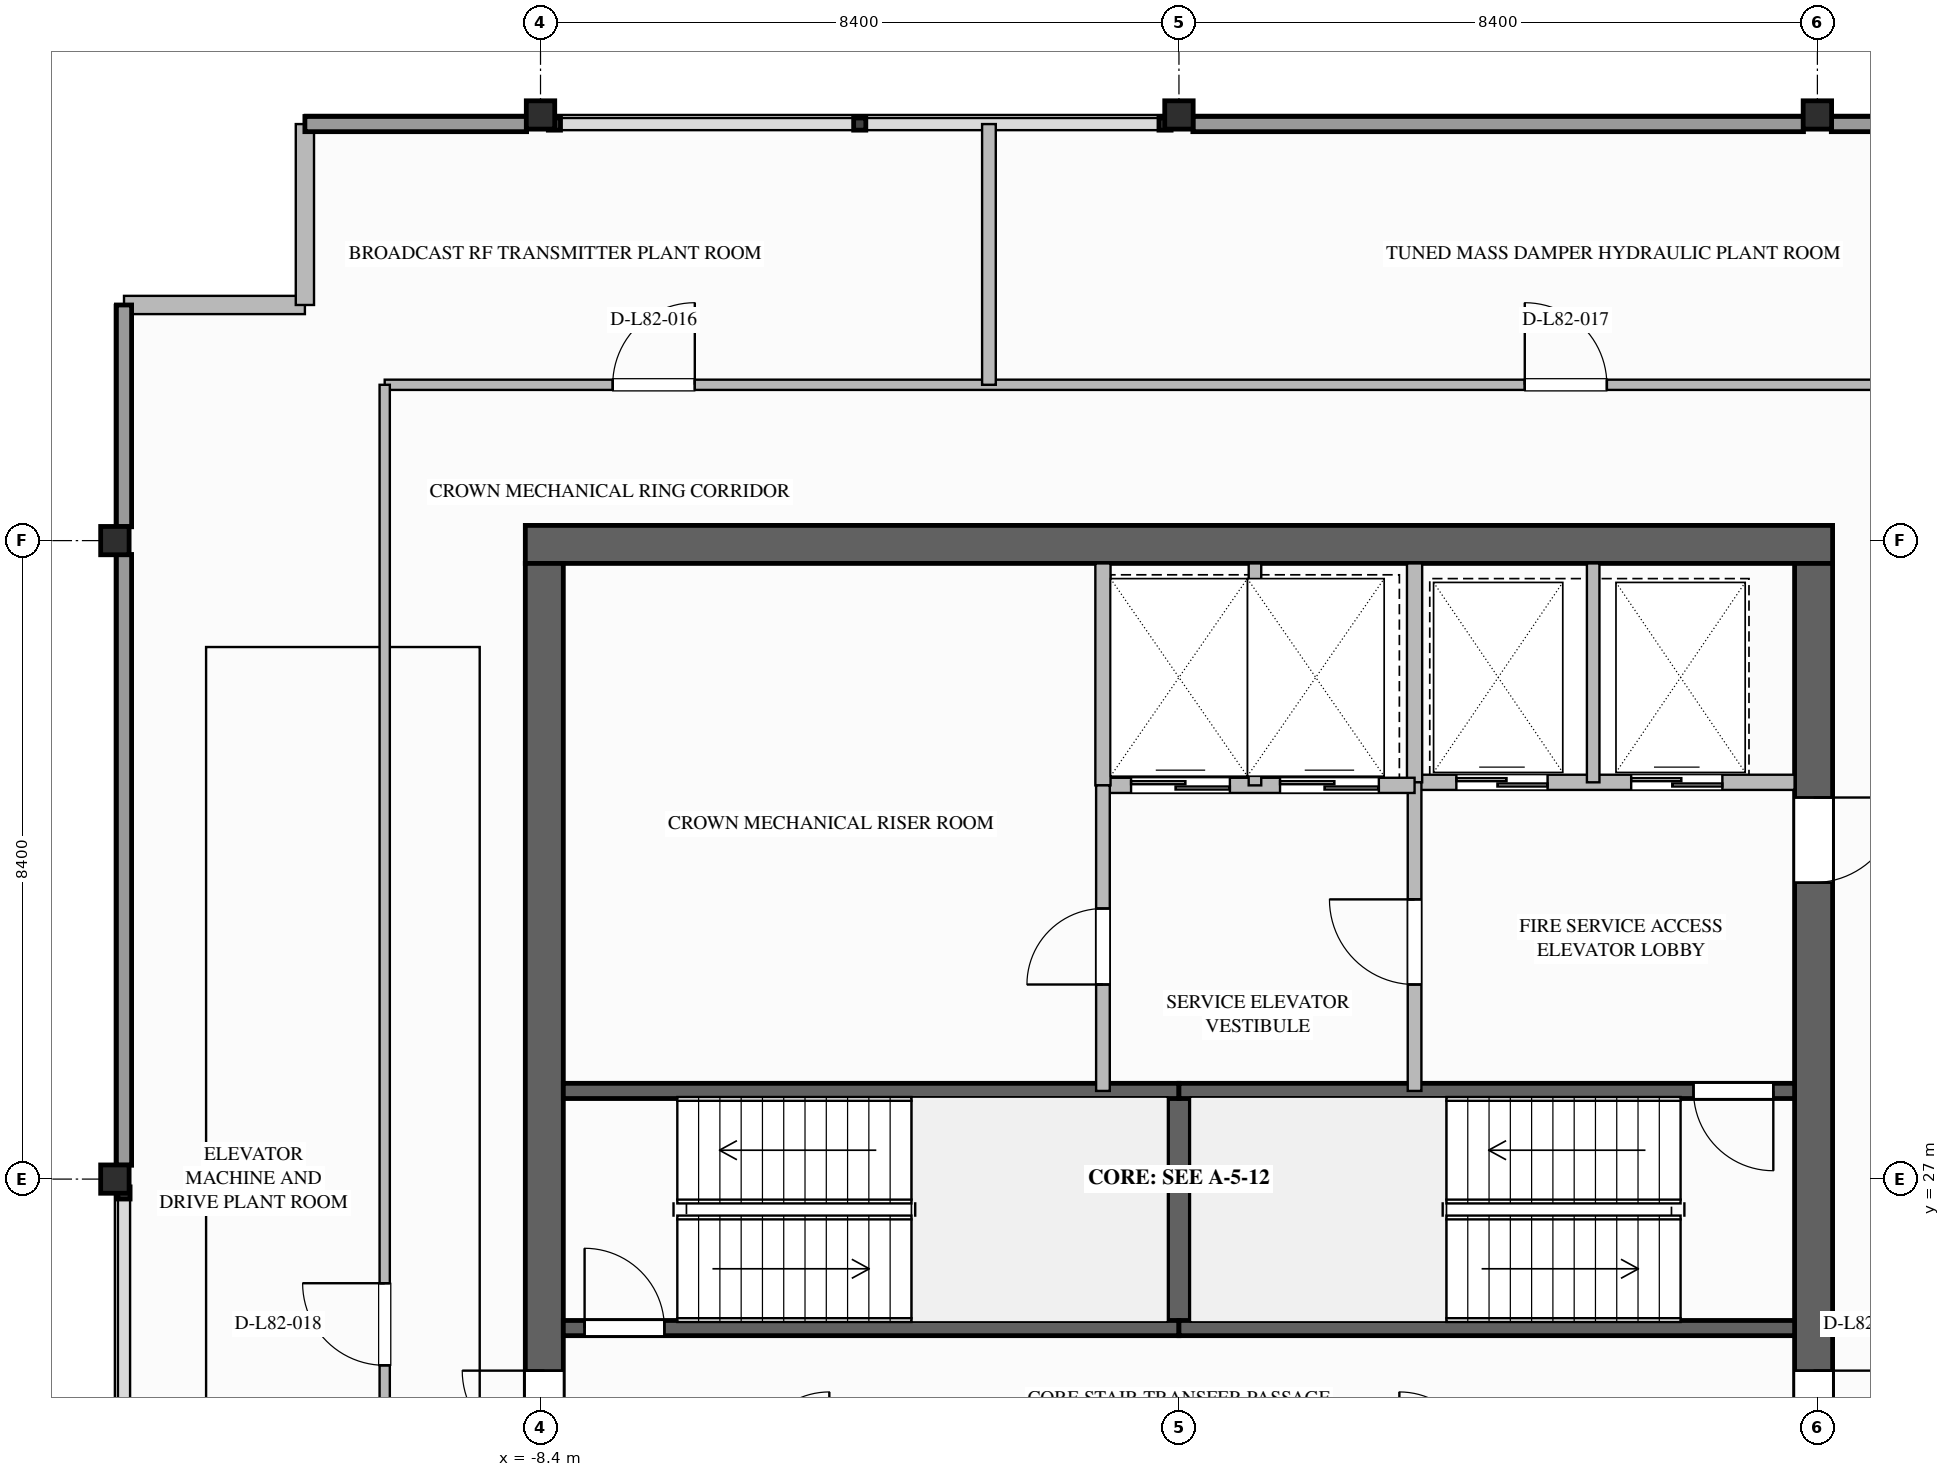
"""IFC4 building model, lengths in metres.
Left out: names, types, materials, properties, quantities, classifications, styles, units other than length and angle.
Written with IfcOpenShell. Run it as: python <this file> out.ifc"""

import sys

from ifc_helpers import new_model, si_unit, direction, frame, frame_2d, origin, origin_2d, place, context, subcontext, project, spatial, rectangle, i_section, extrude, element, fill, save


model = new_model("IFC4")
c1 = context("Model", 3, precision=1e-05, world=origin(), true_north=direction((0.0, 1.0)))
c2 = subcontext(c1, "Body", "Model", "MODEL_VIEW")
j1 = project(units=[si_unit("LENGTHUNIT", "METRE"), si_unit("PLANEANGLEUNIT", "RADIAN")], contexts=[c1])
p1 = place(None, origin())
s1 = spatial("IfcSite", under=j1, at=p1, CompositionType="ELEMENT")
p2 = place(p1, origin())
s2 = spatial("IfcBuilding", under=s1, at=p2, CompositionType="ELEMENT")
p3 = place(p2, frame((0.0, 0.0, 315.4)))
s3 = spatial("IfcBuildingStorey", under=s2, at=p3, CompositionType="ELEMENT", Elevation=315.4)
p4 = place(p3, frame((-8.6, 35.35, 0.0), z_axis=(0.0, 0.0, 1.0), x_axis=(1.0, 0.0, 0.0)))
e1 = element("IfcWall", 1, at=p4, inside=s3, PredefinedType="SHEAR", context=c2, shape_type="SweptSolid", body=[
    extrude(rectangle(XDim=17.2, YDim=0.5, at=frame_2d((8.6, 0.0))), origin(), (0.0, 0.0, 1.0), 4.0),
])
p5 = place(p3, frame((8.35, 35.1, 0.0), z_axis=(0.0, 0.0, 1.0), x_axis=(0.0, -1.0, 0.0)))
e2 = element("IfcWall", 2, at=p5, inside=s3, PredefinedType="SHEAR", context=c2, shape_type="SweptSolid", body=[
    extrude(rectangle(XDim=16.2, YDim=0.5, at=frame_2d((8.1, 0.0))), origin(), (0.0, 0.0, 1.0), 4.0),
])
p6 = place(p5, frame((3.08, 0.0, 0.0)))
e3 = element("IfcOpeningElement", 3, at=p6, cuts=e2, PredefinedType="OPENING", context=c2, shape_type="SweptSolid", body=[
    extrude(rectangle(XDim=1.12, YDim=2.1, at=frame_2d((0.56, 1.05))), frame((0.0, 0.26, 0.0), z_axis=(0.0, -1.0, 0.0), x_axis=(1.0, 0.0, 0.0)), (0.0, 0.0, 1.0), 0.52),
])
p7 = place(p5, frame((10.62, 0.0, 0.0)))
e4 = element("IfcOpeningElement", 4, at=p7, cuts=e2, PredefinedType="OPENING", context=c2, shape_type="SweptSolid", body=[
    extrude(rectangle(XDim=1.08, YDim=2.04, at=frame_2d((0.54, 1.02))), frame((0.0, 0.26, 0.0), z_axis=(0.0, -1.0, 0.0), x_axis=(1.0, 0.0, 0.0)), (0.0, 0.0, 1.0), 0.52),
])
p8 = place(p3, frame((-8.35, 18.9, 0.0), z_axis=(0.0, 0.0, 1.0), x_axis=(0.0, 1.0, 0.0)))
e5 = element("IfcWall", 5, at=p8, inside=s3, PredefinedType="SHEAR", context=c2, shape_type="SweptSolid", body=[
    extrude(rectangle(XDim=16.2, YDim=0.5, at=frame_2d((8.1, 0.0))), origin(), (0.0, 0.0, 1.0), 4.0),
])
p9 = place(p8, frame((4.5, 0.0, 0.0)))
e6 = element("IfcOpeningElement", 6, at=p9, cuts=e5, PredefinedType="OPENING", context=c2, shape_type="SweptSolid", body=[
    extrude(rectangle(XDim=1.08, YDim=2.04, at=frame_2d((0.54, 1.02))), frame((0.0, 0.26, 0.0), z_axis=(0.0, -1.0, 0.0), x_axis=(1.0, 0.0, 0.0)), (0.0, 0.0, 1.0), 0.52),
])
for number, where, z_axis, x_axis in (
    (7, (-14.0, 27.0, 0.0), (0.0, 0.0, 1.0), (1.0, 0.0, 0.0)),
    (8, (-14.0, 35.4, 0.0), (0.0, 0.0, 1.0), (1.0, 0.0, 0.0)),
    (9, (-8.4, 41.0, 0.0), (0.0, 0.0, 1.0), (1.0, 0.0, 0.0)),
    (10, (0.0, 41.0, 0.0), (0.0, 0.0, 1.0), (1.0, 0.0, 0.0)),
    (11, (8.4, 41.0, 0.0), (0.0, 0.0, 1.0), (1.0, 0.0, 0.0)),
):
    element("IfcColumn", number, at=place(p3, frame(where, z_axis=z_axis, x_axis=x_axis)), inside=s3, PredefinedType="COLUMN", context=c2, shape_type="SweptSolid", body=[
        extrude(i_section(OverallWidth=0.374, OverallDepth=0.372, WebThickness=0.016, FlangeThickness=0.026, FilletRadius=0.025, at=origin_2d()), origin(), (0.0, 0.0, 1.0), 3.997),
    ])
for number, where, z_axis, x_axis in (
    (12, (-13.88, 38.5, 0.0), (0.0, 0.0, 1.0), (1.0, 0.0, 0.0)),
    (13, (-11.5, 38.5, 0.0), (0.0, 0.0, 1.0), (0.0, 1.0, 0.0)),
):
    element("IfcWall", number, at=place(p3, frame(where, z_axis=z_axis, x_axis=x_axis)), inside=s3, PredefinedType="STANDARD", context=c2, shape_type="SweptSolid", body=[
        extrude(rectangle(XDim=2.38, YDim=0.24, at=frame_2d((1.19, 0.0))), origin(), (0.0, 0.0, 1.0), 3.68),
    ])
p10 = place(p3, frame((0.0, 25.04, 0.0), z_axis=(0.0, 0.0, 1.0), x_axis=(0.0, 1.0, 0.0)))
e14 = element("IfcWall", 14, at=p10, inside=s3, PredefinedType="SOLIDWALL", context=c2, shape_type="SweptSolid", body=[
    extrude(rectangle(XDim=3.12, YDim=0.3, at=frame_2d((1.56, 0.0))), origin(), (0.0, 0.0, 1.0), 3.68),
])
p11 = place(p3, frame((-8.1, 25.04, 0.0), z_axis=(0.0, 0.0, 1.0), x_axis=(1.0, 0.0, 0.0)))
e15 = element("IfcWall", 15, at=p11, inside=s3, PredefinedType="SOLIDWALL", context=c2, shape_type="SweptSolid", body=[
    extrude(rectangle(XDim=8.1, YDim=0.2, at=frame_2d((4.05, 0.0))), origin(), (0.0, 0.0, 1.0), 3.68),
])
p12 = place(p11, frame((0.28, 0.0, 0.0)))
e16 = element("IfcOpeningElement", 16, at=p12, cuts=e15, PredefinedType="OPENING", context=c2, shape_type="SweptSolid", body=[
    extrude(rectangle(XDim=1.05, YDim=2.1, at=frame_2d((0.525, 1.05))), frame((0.0, 0.11, 0.0), z_axis=(0.0, -1.0, 0.0), x_axis=(1.0, 0.0, 0.0)), (0.0, 0.0, 1.0), 0.22),
])
for number, where, z_axis, x_axis in (
    (17, (-8.1, 28.16, 0.0), (0.0, 0.0, 1.0), (1.0, 0.0, 0.0)),
    (18, (0.0, 25.04, 0.0), (0.0, 0.0, 1.0), (1.0, 0.0, 0.0)),
):
    element("IfcWall", number, at=place(p3, frame(where, z_axis=z_axis, x_axis=x_axis)), inside=s3, PredefinedType="SOLIDWALL", context=c2, shape_type="SweptSolid", body=[
        extrude(rectangle(XDim=8.1, YDim=0.2, at=frame_2d((4.05, 0.0))), origin(), (0.0, 0.0, 1.0), 3.68),
    ])
p13 = place(p3, frame((8.1, 28.16, 0.0), z_axis=(0.0, 0.0, 1.0), x_axis=(-1.0, 0.0, 0.0)))
e19 = element("IfcWall", 19, at=p13, inside=s3, PredefinedType="SOLIDWALL", context=c2, shape_type="SweptSolid", body=[
    extrude(rectangle(XDim=8.1, YDim=0.2, at=frame_2d((4.05, 0.0))), origin(), (0.0, 0.0, 1.0), 3.68),
])
p14 = place(p13, frame((0.28, 0.0, 0.0)))
e20 = element("IfcOpeningElement", 20, at=p14, cuts=e19, PredefinedType="OPENING", context=c2, shape_type="SweptSolid", body=[
    extrude(rectangle(XDim=1.05, YDim=2.1, at=frame_2d((0.525, 1.05))), frame((0.0, 0.11, 0.0), z_axis=(0.0, -1.0, 0.0), x_axis=(1.0, 0.0, 0.0)), (0.0, 0.0, 1.0), 0.22),
])
p15 = place(p3, frame((3.1, 32.22, 0.0), z_axis=(0.0, 0.0, 1.0), x_axis=(1.0, 0.0, 0.0)))
e21 = element("IfcWall", 21, at=p15, inside=s3, PredefinedType="SOLIDWALL", context=c2, shape_type="SweptSolid", body=[
    extrude(rectangle(XDim=5.0, YDim=0.2, at=frame_2d((2.5, 0.0))), origin(), (0.0, 0.0, 1.0), 3.68),
])
p16 = place(p15, frame((0.55, 0.0, 0.0)))
e22 = element("IfcOpeningElement", 22, at=p16, cuts=e21, PredefinedType="OPENING", context=c2, shape_type="SweptSolid", body=[
    extrude(rectangle(XDim=1.2, YDim=2.2, at=frame_2d((0.6, 1.1))), frame((0.0, 0.11, 0.0), z_axis=(0.0, -1.0, 0.0), x_axis=(1.0, 0.0, 0.0)), (0.0, 0.0, 1.0), 0.22),
])
p17 = place(p15, frame((2.85, 0.0, 0.0)))
e23 = element("IfcOpeningElement", 23, at=p17, cuts=e21, PredefinedType="OPENING", context=c2, shape_type="SweptSolid", body=[
    extrude(rectangle(XDim=1.2, YDim=2.2, at=frame_2d((0.6, 1.1))), frame((0.0, 0.11, 0.0), z_axis=(0.0, -1.0, 0.0), x_axis=(1.0, 0.0, 0.0)), (0.0, 0.0, 1.0), 0.22),
])
p18 = place(p3, frame((3.1, 32.22, 0.0), z_axis=(0.0, 0.0, 1.0), x_axis=(0.0, 1.0, 0.0)))
e24 = element("IfcWall", 24, at=p18, inside=s3, PredefinedType="SOLIDWALL", context=c2, shape_type="SweptSolid", body=[
    extrude(rectangle(XDim=2.88, YDim=0.2, at=frame_2d((1.44, 0.0))), origin(), (0.0, 0.0, 1.0), 3.68),
])
p19 = place(p3, frame((5.45, 32.22, 0.0), z_axis=(0.0, 0.0, 1.0), x_axis=(0.0, 1.0, 0.0)))
e25 = element("IfcWall", 25, at=p19, inside=s3, PredefinedType="PARTITIONING", context=c2, shape_type="SweptSolid", body=[
    extrude(rectangle(XDim=2.88, YDim=0.165, at=frame_2d((1.44, 0.0))), origin(), (0.0, 0.0, 1.0), 3.68),
])
p20 = place(p3, frame((3.1, 28.16, 0.0), z_axis=(0.0, 0.0, 1.0), x_axis=(0.0, 1.0, 0.0)))
e26 = element("IfcWall", 26, at=p20, inside=s3, PredefinedType="SOLIDWALL", context=c2, shape_type="SweptSolid", body=[
    extrude(rectangle(XDim=4.06, YDim=0.18, at=frame_2d((2.03, 0.0))), origin(), (0.0, 0.0, 1.0), 3.68),
])
p21 = place(p20, frame((1.4, 0.0, 0.0)))
e27 = element("IfcOpeningElement", 27, at=p21, cuts=e26, PredefinedType="OPENING", context=c2, shape_type="SweptSolid", body=[
    extrude(rectangle(XDim=1.12, YDim=2.1, at=frame_2d((0.56, 1.05))), frame((0.0, 0.1, 0.0), z_axis=(0.0, -1.0, 0.0), x_axis=(1.0, 0.0, 0.0)), (0.0, 0.0, 1.0), 0.2),
])
p22 = place(p3, frame((-1.0, 32.18, 0.0), z_axis=(0.0, 0.0, 1.0), x_axis=(1.0, 0.0, 0.0)))
e28 = element("IfcWall", 28, at=p22, inside=s3, PredefinedType="SOLIDWALL", context=c2, shape_type="SweptSolid", body=[
    extrude(rectangle(XDim=4.1, YDim=0.2, at=frame_2d((2.05, 0.0))), origin(), (0.0, 0.0, 1.0), 3.68),
])
p23 = place(p22, frame((0.37, 0.0, 0.0)))
e29 = element("IfcOpeningElement", 29, at=p23, cuts=e28, PredefinedType="OPENING", context=c2, shape_type="SweptSolid", body=[
    extrude(rectangle(XDim=1.3, YDim=2.2, at=frame_2d((0.65, 1.1))), frame((0.0, 0.11, 0.0), z_axis=(0.0, -1.0, 0.0), x_axis=(1.0, 0.0, 0.0)), (0.0, 0.0, 1.0), 0.22),
])
p24 = place(p22, frame((2.33, 0.0, 0.0)))
e30 = element("IfcOpeningElement", 30, at=p24, cuts=e28, PredefinedType="OPENING", context=c2, shape_type="SweptSolid", body=[
    extrude(rectangle(XDim=1.3, YDim=2.2, at=frame_2d((0.65, 1.1))), frame((0.0, 0.11, 0.0), z_axis=(0.0, -1.0, 0.0), x_axis=(1.0, 0.0, 0.0)), (0.0, 0.0, 1.0), 0.22),
])
p25 = place(p3, frame((-1.0, 32.18, 0.0), z_axis=(0.0, 0.0, 1.0), x_axis=(0.0, 1.0, 0.0)))
e31 = element("IfcWall", 31, at=p25, inside=s3, PredefinedType="SOLIDWALL", context=c2, shape_type="SweptSolid", body=[
    extrude(rectangle(XDim=2.92, YDim=0.2, at=frame_2d((1.46, 0.0))), origin(), (0.0, 0.0, 1.0), 3.68),
])
p26 = place(p3, frame((1.0, 32.18, 0.0), z_axis=(0.0, 0.0, 1.0), x_axis=(0.0, 1.0, 0.0)))
e32 = element("IfcWall", 32, at=p26, inside=s3, PredefinedType="PARTITIONING", context=c2, shape_type="SweptSolid", body=[
    extrude(rectangle(XDim=2.92, YDim=0.165, at=frame_2d((1.46, 0.0))), origin(), (0.0, 0.0, 1.0), 3.68),
])
p27 = place(p3, frame((-1.0, 28.16, 0.0), z_axis=(0.0, 0.0, 1.0), x_axis=(0.0, 1.0, 0.0)))
e33 = element("IfcWall", 33, at=p27, inside=s3, PredefinedType="SOLIDWALL", context=c2, shape_type="SweptSolid", body=[
    extrude(rectangle(XDim=4.02, YDim=0.18, at=frame_2d((2.01, 0.0))), origin(), (0.0, 0.0, 1.0), 3.68),
])
p28 = place(p27, frame((1.4, 0.0, 0.0)))
e34 = element("IfcOpeningElement", 34, at=p28, cuts=e33, PredefinedType="OPENING", context=c2, shape_type="SweptSolid", body=[
    extrude(rectangle(XDim=1.0, YDim=2.1, at=frame_2d((0.5, 1.05))), frame((0.0, 0.1, 0.0), z_axis=(0.0, -1.0, 0.0), x_axis=(1.0, 0.0, 0.0)), (0.0, 0.0, 1.0), 0.2),
])
p29 = place(p3, frame((-10.45, 37.45, 0.0), z_axis=(0.0, 0.0, 1.0), x_axis=(1.0, 0.0, 0.0)))
e35 = element("IfcWall", 35, at=p29, inside=s3, PredefinedType="PARTITIONING", context=c2, shape_type="SweptSolid", body=[
    extrude(rectangle(XDim=20.9, YDim=0.135, at=frame_2d((10.45, 0.0))), origin(), (0.0, 0.0, 1.0), 3.68),
])
p30 = place(p29, frame((3.0, 0.0, 0.0)))
e36 = element("IfcOpeningElement", 36, at=p30, cuts=e35, PredefinedType="OPENING", context=c2, shape_type="SweptSolid", body=[
    extrude(rectangle(XDim=1.08, YDim=2.04, at=frame_2d((0.54, 1.02))), frame((0.0, 0.077, 0.0), z_axis=(0.0, -1.0, 0.0), x_axis=(1.0, 0.0, 0.0)), (0.0, 0.0, 1.0), 0.155),
])
p31 = place(p29, frame((15.0, 0.0, 0.0)))
e37 = element("IfcOpeningElement", 37, at=p31, cuts=e35, PredefinedType="OPENING", context=c2, shape_type="SweptSolid", body=[
    extrude(rectangle(XDim=1.08, YDim=2.04, at=frame_2d((0.54, 1.02))), frame((0.0, 0.077, 0.0), z_axis=(0.0, -1.0, 0.0), x_axis=(1.0, 0.0, 0.0)), (0.0, 0.0, 1.0), 0.155),
])
p32 = place(p3, frame((-10.45, 16.55, 0.0), z_axis=(0.0, 0.0, 1.0), x_axis=(0.0, 1.0, 0.0)))
e38 = element("IfcWall", 38, at=p32, inside=s3, PredefinedType="PARTITIONING", context=c2, shape_type="SweptSolid", body=[
    extrude(rectangle(XDim=20.9, YDim=0.135, at=frame_2d((10.45, 0.0))), origin(), (0.0, 0.0, 1.0), 3.68),
])
p33 = place(p32, frame((8.0, 0.0, 0.0)))
e39 = element("IfcOpeningElement", 39, at=p33, cuts=e38, PredefinedType="OPENING", context=c2, shape_type="SweptSolid", body=[
    extrude(rectangle(XDim=1.08, YDim=2.04, at=frame_2d((0.54, 1.02))), frame((0.0, 0.077, 0.0), z_axis=(0.0, -1.0, 0.0), x_axis=(1.0, 0.0, 0.0)), (0.0, 0.0, 1.0), 0.155),
])
p34 = place(p3, frame((-2.5, 37.45, 0.0), z_axis=(0.0, 0.0, 1.0), x_axis=(0.0, 1.0, 0.0)))
e40 = element("IfcWall", 40, at=p34, inside=s3, PredefinedType="SOLIDWALL", context=c2, shape_type="SweptSolid", body=[
    extrude(rectangle(XDim=3.43, YDim=0.18, at=frame_2d((1.715, 0.0))), origin(), (0.0, 0.0, 1.0), 3.68),
])
p35 = place(p12, origin())
e41 = element("IfcDoor", 41, at=p35, inside=s3, OperationType="SINGLE_SWING_LEFT", PredefinedType="DOOR", context=c2, shape_type="SweptSolid", body=[
    extrude(rectangle(XDim=1.05, YDim=2.1, at=frame_2d((0.525, 1.05))), frame((0.0, 0.025, 0.0), z_axis=(0.0, -1.0, 0.0), x_axis=(1.0, 0.0, 0.0)), (0.0, 0.0, 1.0), 0.05),
])
fill(e16, e41)
p36 = place(p14, origin())
e42 = element("IfcDoor", 42, at=p36, inside=s3, OperationType="SINGLE_SWING_LEFT", PredefinedType="DOOR", context=c2, shape_type="SweptSolid", body=[
    extrude(rectangle(XDim=1.05, YDim=2.1, at=frame_2d((0.525, 1.05))), frame((0.0, 0.025, 0.0), z_axis=(0.0, -1.0, 0.0), x_axis=(1.0, 0.0, 0.0)), (0.0, 0.0, 1.0), 0.05),
])
fill(e20, e42)
p37 = place(p16, origin())
e43 = element("IfcDoor", 43, at=p37, inside=s3, OperationType="SLIDING_TO_LEFT", PredefinedType="DOOR", context=c2, shape_type="SweptSolid", body=[
    extrude(rectangle(XDim=1.2, YDim=2.2, at=frame_2d((0.6, 1.1))), frame((0.0, 0.025, 0.0), z_axis=(0.0, -1.0, 0.0), x_axis=(1.0, 0.0, 0.0)), (0.0, 0.0, 1.0), 0.05),
])
fill(e22, e43)
p38 = place(p17, origin())
e44 = element("IfcDoor", 44, at=p38, inside=s3, OperationType="SLIDING_TO_LEFT", PredefinedType="DOOR", context=c2, shape_type="SweptSolid", body=[
    extrude(rectangle(XDim=1.2, YDim=2.2, at=frame_2d((0.6, 1.1))), frame((0.0, 0.025, 0.0), z_axis=(0.0, -1.0, 0.0), x_axis=(1.0, 0.0, 0.0)), (0.0, 0.0, 1.0), 0.05),
])
fill(e23, e44)
p39 = place(p21, origin())
e45 = element("IfcDoor", 45, at=p39, inside=s3, OperationType="SINGLE_SWING_RIGHT", PredefinedType="DOOR", context=c2, shape_type="SweptSolid", body=[
    extrude(rectangle(XDim=1.12, YDim=2.1, at=frame_2d((0.56, 1.05))), frame((0.0, 0.025, 0.0), z_axis=(0.0, -1.0, 0.0), x_axis=(1.0, 0.0, 0.0)), (0.0, 0.0, 1.0), 0.05),
])
fill(e27, e45)
p40 = place(p6, origin())
e46 = element("IfcDoor", 46, at=p40, inside=s3, OperationType="SINGLE_SWING_LEFT", PredefinedType="DOOR", context=c2, shape_type="SweptSolid", body=[
    extrude(rectangle(XDim=1.12, YDim=2.1, at=frame_2d((0.56, 1.05))), frame((0.0, 0.025, 0.0), z_axis=(0.0, -1.0, 0.0), x_axis=(1.0, 0.0, 0.0)), (0.0, 0.0, 1.0), 0.05),
])
fill(e3, e46)
p41 = place(p23, origin())
e47 = element("IfcDoor", 47, at=p41, inside=s3, OperationType="SLIDING_TO_LEFT", PredefinedType="DOOR", context=c2, shape_type="SweptSolid", body=[
    extrude(rectangle(XDim=1.3, YDim=2.2, at=frame_2d((0.65, 1.1))), frame((0.0, 0.025, 0.0), z_axis=(0.0, -1.0, 0.0), x_axis=(1.0, 0.0, 0.0)), (0.0, 0.0, 1.0), 0.05),
])
fill(e29, e47)
p42 = place(p24, origin())
e48 = element("IfcDoor", 48, at=p42, inside=s3, OperationType="SLIDING_TO_LEFT", PredefinedType="DOOR", context=c2, shape_type="SweptSolid", body=[
    extrude(rectangle(XDim=1.3, YDim=2.2, at=frame_2d((0.65, 1.1))), frame((0.0, 0.025, 0.0), z_axis=(0.0, -1.0, 0.0), x_axis=(1.0, 0.0, 0.0)), (0.0, 0.0, 1.0), 0.05),
])
fill(e30, e48)
p43 = place(p28, origin())
e49 = element("IfcDoor", 49, at=p43, inside=s3, OperationType="SINGLE_SWING_LEFT", PredefinedType="DOOR", context=c2, shape_type="SweptSolid", body=[
    extrude(rectangle(XDim=1.0, YDim=2.1, at=frame_2d((0.5, 1.05))), frame((0.0, 0.025, 0.0), z_axis=(0.0, -1.0, 0.0), x_axis=(1.0, 0.0, 0.0)), (0.0, 0.0, 1.0), 0.05),
])
fill(e34, e49)
p44 = place(p9, origin())
e50 = element("IfcDoor", 50, at=p44, inside=s3, OperationType="SINGLE_SWING_RIGHT", PredefinedType="DOOR", context=c2, shape_type="SweptSolid", body=[
    extrude(rectangle(XDim=1.08, YDim=2.04, at=frame_2d((0.54, 1.02))), frame((0.0, 0.025, 0.0), z_axis=(0.0, -1.0, 0.0), x_axis=(1.0, 0.0, 0.0)), (0.0, 0.0, 1.0), 0.05),
])
fill(e6, e50)
p45 = place(p7, origin())
e51 = element("IfcDoor", 51, at=p45, inside=s3, OperationType="SINGLE_SWING_LEFT", PredefinedType="DOOR", context=c2, shape_type="SweptSolid", body=[
    extrude(rectangle(XDim=1.08, YDim=2.04, at=frame_2d((0.54, 1.02))), frame((0.0, 0.025, 0.0), z_axis=(0.0, -1.0, 0.0), x_axis=(1.0, 0.0, 0.0)), (0.0, 0.0, 1.0), 0.05),
])
fill(e4, e51)
p46 = place(p30, origin())
e52 = element("IfcDoor", 52, at=p46, inside=s3, OperationType="SINGLE_SWING_RIGHT", PredefinedType="DOOR", context=c2, shape_type="SweptSolid", body=[
    extrude(rectangle(XDim=1.08, YDim=2.04, at=frame_2d((0.54, 1.02))), frame((0.0, 0.025, 0.0), z_axis=(0.0, -1.0, 0.0), x_axis=(1.0, 0.0, 0.0)), (0.0, 0.0, 1.0), 0.05),
])
fill(e36, e52)
p47 = place(p31, origin())
e53 = element("IfcDoor", 53, at=p47, inside=s3, OperationType="SINGLE_SWING_LEFT", PredefinedType="DOOR", context=c2, shape_type="SweptSolid", body=[
    extrude(rectangle(XDim=1.08, YDim=2.04, at=frame_2d((0.54, 1.02))), frame((0.0, 0.025, 0.0), z_axis=(0.0, -1.0, 0.0), x_axis=(1.0, 0.0, 0.0)), (0.0, 0.0, 1.0), 0.05),
])
fill(e37, e53)
p48 = place(p33, origin())
e54 = element("IfcDoor", 54, at=p48, inside=s3, OperationType="SINGLE_SWING_RIGHT", PredefinedType="DOOR", context=c2, shape_type="SweptSolid", body=[
    extrude(rectangle(XDim=1.08, YDim=2.04, at=frame_2d((0.54, 1.02))), frame((0.0, 0.025, 0.0), z_axis=(0.0, -1.0, 0.0), x_axis=(1.0, 0.0, 0.0)), (0.0, 0.0, 1.0), 0.05),
])
fill(e39, e54)
save(model, sys.argv[1])
